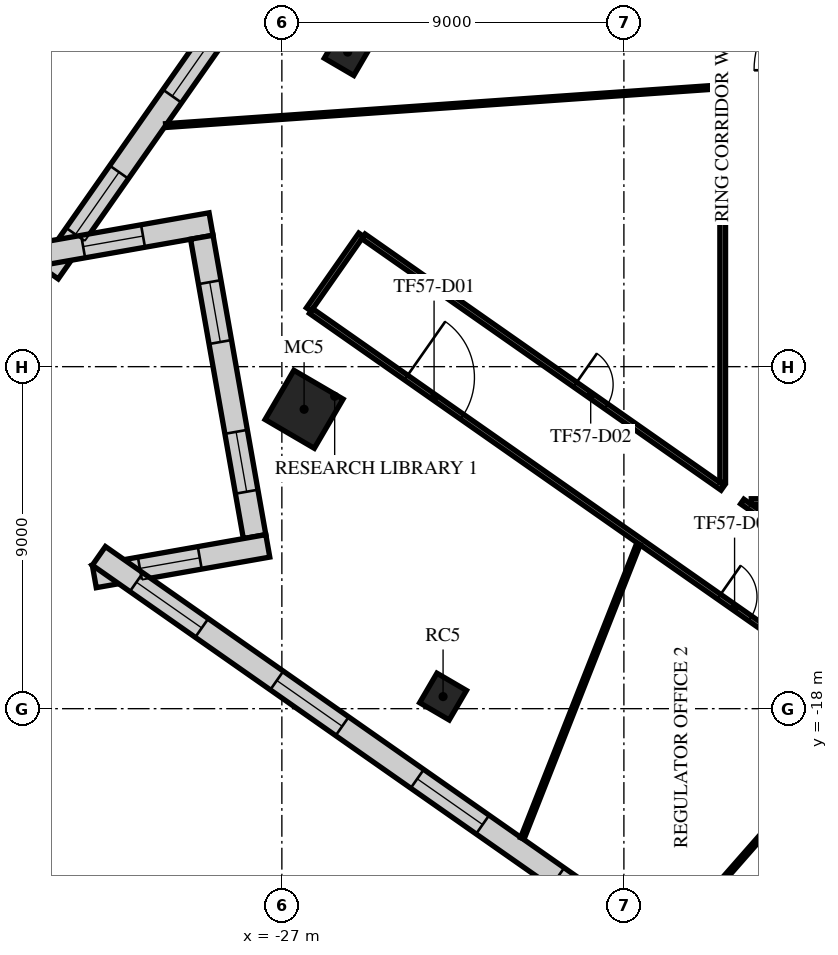
"""IFC4 building model, lengths in metres.
Left out: names, types, materials, properties, quantities, classifications, styles, units other than length and angle.
Written with IfcOpenShell. Run it as: python <this file> out.ifc"""

import sys

from ifc_helpers import new_model, si_unit, direction, frame, frame_2d, origin, origin_2d, place, context, subcontext, project, spatial, rectangle, extrude, element, fill, save


model = new_model("IFC4")
c1 = context("Model", 3, precision=1e-05, world=origin(), true_north=direction((0.0, 1.0)))
c2 = subcontext(c1, "Body", "Model", "MODEL_VIEW")
j1 = project(units=[si_unit("LENGTHUNIT", "METRE"), si_unit("PLANEANGLEUNIT", "RADIAN")], contexts=[c1])
p1 = place(None, origin())
s1 = spatial("IfcSite", under=j1, at=p1, CompositionType="ELEMENT")
p2 = place(p1, origin())
s2 = spatial("IfcBuilding", under=s1, at=p2, CompositionType="ELEMENT")
p3 = place(p2, frame((0.0, 0.0, 246.9)))
s3 = spatial("IfcBuildingStorey", under=s2, at=p3, CompositionType="ELEMENT", Elevation=246.9)
p4 = place(p3, frame((-25.268, -0.722, 0.0), z_axis=(0.0, 0.0, 1.0), x_axis=(0.504643651291, 0.863327739165, 0.0)))
e1 = element("IfcColumn", 1, at=p4, inside=s3, PredefinedType="COLUMN", context=c2, shape_type="SweptSolid", body=[
    extrude(rectangle(XDim=0.9, YDim=0.9, at=origin_2d()), origin(), (0.0, 0.0, 1.0), 4.0),
])
p5 = place(p3, frame((-26.415, -10.122, 0.0), z_axis=(0.0, 0.0, 1.0), x_axis=(0.504643651291, 0.863327739165, 0.0)))
e2 = element("IfcColumn", 2, at=p5, inside=s3, PredefinedType="COLUMN", context=c2, shape_type="SweptSolid", body=[
    extrude(rectangle(XDim=1.5, YDim=1.5, at=origin_2d()), origin(), (0.0, 0.0, 1.0), 4.0),
])
p6 = place(p3, frame((-22.758, -17.682, 0.0), z_axis=(0.0, 0.0, 1.0), x_axis=(0.504643651291, 0.863327739165, 0.0)))
e3 = element("IfcColumn", 3, at=p6, inside=s3, PredefinedType="COLUMN", context=c2, shape_type="SweptSolid", body=[
    extrude(rectangle(XDim=0.9, YDim=0.9, at=origin_2d()), origin(), (0.0, 0.0, 1.0), 4.0),
])
p7 = place(p3, frame((-5.115, 33.491, 0.0), z_axis=(0.0, 0.0, 1.0), x_axis=(-0.57357740375, -0.819151366908, 0.0)))
e4 = element("IfcWall", 4, at=p7, inside=s3, PredefinedType="STANDARD", context=c2, shape_type="SweptSolid", body=[
    extrude(rectangle(XDim=48.843, YDim=0.6, at=frame_2d((24.422, 0.0))), origin(), (0.0, 0.0, 1.0), 3.64),
])
p8 = place(p7, frame((1.22, 0.0, 0.9)))
e5 = element("IfcOpeningElement", 5, at=p8, cuts=e4, PredefinedType="OPENING", context=c2, shape_type="SweptSolid", body=[
    extrude(rectangle(XDim=2.0, YDim=2.1, at=frame_2d((1.0, 1.05))), frame((0.0, 0.31, 0.0), z_axis=(0.0, -1.0, 0.0), x_axis=(1.0, 0.0, 0.0)), (0.0, 0.0, 1.0), 0.62),
])
p9 = place(p7, frame((5.66, 0.0, 0.9)))
e6 = element("IfcOpeningElement", 6, at=p9, cuts=e4, PredefinedType="OPENING", context=c2, shape_type="SweptSolid", body=[
    extrude(rectangle(XDim=2.0, YDim=2.1, at=frame_2d((1.0, 1.05))), frame((0.0, 0.31, 0.0), z_axis=(0.0, -1.0, 0.0), x_axis=(1.0, 0.0, 0.0)), (0.0, 0.0, 1.0), 0.62),
])
p10 = place(p7, frame((10.101, 0.0, 0.9)))
e7 = element("IfcOpeningElement", 7, at=p10, cuts=e4, PredefinedType="OPENING", context=c2, shape_type="SweptSolid", body=[
    extrude(rectangle(XDim=2.0, YDim=2.1, at=frame_2d((1.0, 1.05))), frame((0.0, 0.31, 0.0), z_axis=(0.0, -1.0, 0.0), x_axis=(1.0, 0.0, 0.0)), (0.0, 0.0, 1.0), 0.62),
])
p11 = place(p7, frame((14.541, 0.0, 0.9)))
e8 = element("IfcOpeningElement", 8, at=p11, cuts=e4, PredefinedType="OPENING", context=c2, shape_type="SweptSolid", body=[
    extrude(rectangle(XDim=2.0, YDim=2.1, at=frame_2d((1.0, 1.05))), frame((0.0, 0.31, 0.0), z_axis=(0.0, -1.0, 0.0), x_axis=(1.0, 0.0, 0.0)), (0.0, 0.0, 1.0), 0.62),
])
p12 = place(p7, frame((18.981, 0.0, 0.9)))
e9 = element("IfcOpeningElement", 9, at=p12, cuts=e4, PredefinedType="OPENING", context=c2, shape_type="SweptSolid", body=[
    extrude(rectangle(XDim=2.0, YDim=2.1, at=frame_2d((1.0, 1.05))), frame((0.0, 0.31, 0.0), z_axis=(0.0, -1.0, 0.0), x_axis=(1.0, 0.0, 0.0)), (0.0, 0.0, 1.0), 0.62),
])
p13 = place(p7, frame((23.422, 0.0, 0.9)))
e10 = element("IfcOpeningElement", 10, at=p13, cuts=e4, PredefinedType="OPENING", context=c2, shape_type="SweptSolid", body=[
    extrude(rectangle(XDim=2.0, YDim=2.1, at=frame_2d((1.0, 1.05))), frame((0.0, 0.31, 0.0), z_axis=(0.0, -1.0, 0.0), x_axis=(1.0, 0.0, 0.0)), (0.0, 0.0, 1.0), 0.62),
])
p14 = place(p7, frame((27.862, 0.0, 0.9)))
e11 = element("IfcOpeningElement", 11, at=p14, cuts=e4, PredefinedType="OPENING", context=c2, shape_type="SweptSolid", body=[
    extrude(rectangle(XDim=2.0, YDim=2.1, at=frame_2d((1.0, 1.05))), frame((0.0, 0.31, 0.0), z_axis=(0.0, -1.0, 0.0), x_axis=(1.0, 0.0, 0.0)), (0.0, 0.0, 1.0), 0.62),
])
p15 = place(p7, frame((32.302, 0.0, 0.9)))
e12 = element("IfcOpeningElement", 12, at=p15, cuts=e4, PredefinedType="OPENING", context=c2, shape_type="SweptSolid", body=[
    extrude(rectangle(XDim=2.0, YDim=2.1, at=frame_2d((1.0, 1.05))), frame((0.0, 0.31, 0.0), z_axis=(0.0, -1.0, 0.0), x_axis=(1.0, 0.0, 0.0)), (0.0, 0.0, 1.0), 0.62),
])
p16 = place(p7, frame((36.742, 0.0, 0.9)))
e13 = element("IfcOpeningElement", 13, at=p16, cuts=e4, PredefinedType="OPENING", context=c2, shape_type="SweptSolid", body=[
    extrude(rectangle(XDim=2.0, YDim=2.1, at=frame_2d((1.0, 1.05))), frame((0.0, 0.31, 0.0), z_axis=(0.0, -1.0, 0.0), x_axis=(1.0, 0.0, 0.0)), (0.0, 0.0, 1.0), 0.62),
])
p17 = place(p7, frame((41.183, 0.0, 0.9)))
e14 = element("IfcOpeningElement", 14, at=p17, cuts=e4, PredefinedType="OPENING", context=c2, shape_type="SweptSolid", body=[
    extrude(rectangle(XDim=2.0, YDim=2.1, at=frame_2d((1.0, 1.05))), frame((0.0, 0.31, 0.0), z_axis=(0.0, -1.0, 0.0), x_axis=(1.0, 0.0, 0.0)), (0.0, 0.0, 1.0), 0.62),
])
p18 = place(p7, frame((45.623, 0.0, 0.9)))
e15 = element("IfcOpeningElement", 15, at=p18, cuts=e4, PredefinedType="OPENING", context=c2, shape_type="SweptSolid", body=[
    extrude(rectangle(XDim=2.0, YDim=2.1, at=frame_2d((1.0, 1.05))), frame((0.0, 0.31, 0.0), z_axis=(0.0, -1.0, 0.0), x_axis=(1.0, 0.0, 0.0)), (0.0, 0.0, 1.0), 0.62),
])
p19 = place(p3, frame((-33.429, -6.052, 0.0), z_axis=(0.0, 0.0, 1.0), x_axis=(0.984808997794, 0.173641118013, 0.0)))
e16 = element("IfcWall", 16, at=p19, inside=s3, PredefinedType="STANDARD", context=c2, shape_type="SweptSolid", body=[
    extrude(rectangle(XDim=4.635, YDim=0.6, at=frame_2d((2.318, 0.0))), origin(), (0.0, 0.0, 1.0), 3.64),
])
p20 = place(p19, frame((1.218, 0.0, 0.9)))
e17 = element("IfcOpeningElement", 17, at=p20, cuts=e16, PredefinedType="OPENING", context=c2, shape_type="SweptSolid", body=[
    extrude(rectangle(XDim=1.6, YDim=2.1, at=frame_2d((0.8, 1.05))), frame((0.0, 0.31, 0.0), z_axis=(0.0, -1.0, 0.0), x_axis=(1.0, 0.0, 0.0)), (0.0, 0.0, 1.0), 0.62),
])
p21 = place(p3, frame((-29.107, -5.594, 0.0), z_axis=(0.0, 0.0, 1.0), x_axis=(0.173640837858, -0.98480904719, 0.0)))
e18 = element("IfcWall", 18, at=p21, inside=s3, PredefinedType="STANDARD", context=c2, shape_type="SweptSolid", body=[
    extrude(rectangle(XDim=8.0, YDim=0.6, at=frame_2d((4.0, 0.0))), origin(), (0.0, 0.0, 1.0), 3.64),
])
p22 = place(p21, frame((1.2, 0.0, 0.9)))
e19 = element("IfcOpeningElement", 19, at=p22, cuts=e18, PredefinedType="OPENING", context=c2, shape_type="SweptSolid", body=[
    extrude(rectangle(XDim=1.6, YDim=2.1, at=frame_2d((0.8, 1.05))), frame((0.0, 0.31, 0.0), z_axis=(0.0, -1.0, 0.0), x_axis=(1.0, 0.0, 0.0)), (0.0, 0.0, 1.0), 0.62),
])
p23 = place(p21, frame((5.2, 0.0, 0.9)))
e20 = element("IfcOpeningElement", 20, at=p23, cuts=e18, PredefinedType="OPENING", context=c2, shape_type="SweptSolid", body=[
    extrude(rectangle(XDim=1.6, YDim=2.1, at=frame_2d((0.8, 1.05))), frame((0.0, 0.31, 0.0), z_axis=(0.0, -1.0, 0.0), x_axis=(1.0, 0.0, 0.0)), (0.0, 0.0, 1.0), 0.62),
])
p24 = place(p3, frame((-27.37, -13.716, 0.0), z_axis=(0.0, 0.0, 1.0), x_axis=(-0.984799990421, -0.173692195754, 0.0)))
e21 = element("IfcWall", 21, at=p24, inside=s3, PredefinedType="STANDARD", context=c2, shape_type="SweptSolid", body=[
    extrude(rectangle(XDim=4.636, YDim=0.6, at=frame_2d((2.318, 0.0))), origin(), (0.0, 0.0, 1.0), 3.64),
])
p25 = place(p24, frame((1.818, 0.0, 0.9)))
e22 = element("IfcOpeningElement", 22, at=p25, cuts=e21, PredefinedType="OPENING", context=c2, shape_type="SweptSolid", body=[
    extrude(rectangle(XDim=1.6, YDim=2.1, at=frame_2d((0.8, 1.05))), frame((0.0, 0.31, 0.0), z_axis=(0.0, -1.0, 0.0), x_axis=(1.0, 0.0, 0.0)), (0.0, 0.0, 1.0), 0.62),
])
p26 = place(p3, frame((-31.815, -13.98, 0.0), z_axis=(0.0, 0.0, 1.0), x_axis=(0.819151180661, -0.573577669737, 0.0)))
e23 = element("IfcWall", 23, at=p26, inside=s3, PredefinedType="STANDARD", context=c2, shape_type="SweptSolid", body=[
    extrude(rectangle(XDim=36.086, YDim=0.6, at=frame_2d((18.043, 0.0))), origin(), (0.0, 0.0, 1.0), 3.64),
])
p27 = place(p26, frame((1.205, 0.0, 0.9)))
e24 = element("IfcOpeningElement", 24, at=p27, cuts=e23, PredefinedType="OPENING", context=c2, shape_type="SweptSolid", body=[
    extrude(rectangle(XDim=2.1, YDim=2.1, at=frame_2d((1.05, 1.05))), frame((0.0, 0.31, 0.0), z_axis=(0.0, -1.0, 0.0), x_axis=(1.0, 0.0, 0.0)), (0.0, 0.0, 1.0), 0.62),
])
p28 = place(p26, frame((5.716, 0.0, 0.9)))
e25 = element("IfcOpeningElement", 25, at=p28, cuts=e23, PredefinedType="OPENING", context=c2, shape_type="SweptSolid", body=[
    extrude(rectangle(XDim=2.1, YDim=2.1, at=frame_2d((1.05, 1.05))), frame((0.0, 0.31, 0.0), z_axis=(0.0, -1.0, 0.0), x_axis=(1.0, 0.0, 0.0)), (0.0, 0.0, 1.0), 0.62),
])
p29 = place(p26, frame((10.227, 0.0, 0.9)))
e26 = element("IfcOpeningElement", 26, at=p29, cuts=e23, PredefinedType="OPENING", context=c2, shape_type="SweptSolid", body=[
    extrude(rectangle(XDim=2.1, YDim=2.1, at=frame_2d((1.05, 1.05))), frame((0.0, 0.31, 0.0), z_axis=(0.0, -1.0, 0.0), x_axis=(1.0, 0.0, 0.0)), (0.0, 0.0, 1.0), 0.62),
])
p30 = place(p26, frame((14.738, 0.0, 0.9)))
e27 = element("IfcOpeningElement", 27, at=p30, cuts=e23, PredefinedType="OPENING", context=c2, shape_type="SweptSolid", body=[
    extrude(rectangle(XDim=2.1, YDim=2.1, at=frame_2d((1.05, 1.05))), frame((0.0, 0.31, 0.0), z_axis=(0.0, -1.0, 0.0), x_axis=(1.0, 0.0, 0.0)), (0.0, 0.0, 1.0), 0.62),
])
p31 = place(p26, frame((19.249, 0.0, 0.9)))
e28 = element("IfcOpeningElement", 28, at=p31, cuts=e23, PredefinedType="OPENING", context=c2, shape_type="SweptSolid", body=[
    extrude(rectangle(XDim=2.1, YDim=2.1, at=frame_2d((1.05, 1.05))), frame((0.0, 0.31, 0.0), z_axis=(0.0, -1.0, 0.0), x_axis=(1.0, 0.0, 0.0)), (0.0, 0.0, 1.0), 0.62),
])
p32 = place(p26, frame((23.759, 0.0, 0.9)))
e29 = element("IfcOpeningElement", 29, at=p32, cuts=e23, PredefinedType="OPENING", context=c2, shape_type="SweptSolid", body=[
    extrude(rectangle(XDim=2.1, YDim=2.1, at=frame_2d((1.05, 1.05))), frame((0.0, 0.31, 0.0), z_axis=(0.0, -1.0, 0.0), x_axis=(1.0, 0.0, 0.0)), (0.0, 0.0, 1.0), 0.62),
])
p33 = place(p26, frame((28.27, 0.0, 0.9)))
e30 = element("IfcOpeningElement", 30, at=p33, cuts=e23, PredefinedType="OPENING", context=c2, shape_type="SweptSolid", body=[
    extrude(rectangle(XDim=2.1, YDim=2.1, at=frame_2d((1.05, 1.05))), frame((0.0, 0.31, 0.0), z_axis=(0.0, -1.0, 0.0), x_axis=(1.0, 0.0, 0.0)), (0.0, 0.0, 1.0), 0.62),
])
p34 = place(p26, frame((32.781, 0.0, 0.9)))
e31 = element("IfcOpeningElement", 31, at=p34, cuts=e23, PredefinedType="OPENING", context=c2, shape_type="SweptSolid", body=[
    extrude(rectangle(XDim=2.1, YDim=2.1, at=frame_2d((1.05, 1.05))), frame((0.0, 0.31, 0.0), z_axis=(0.0, -1.0, 0.0), x_axis=(1.0, 0.0, 0.0)), (0.0, 0.0, 1.0), 0.62),
])
p35 = place(p3, frame((-26.292, -7.494, 0.0), z_axis=(0.0, 0.0, 1.0), x_axis=(0.573708088123, 0.819059844958, 0.0)))
e32 = element("IfcWall", 32, at=p35, inside=s3, PredefinedType="PARTITIONING", context=c2, shape_type="SweptSolid", body=[
    extrude(rectangle(XDim=2.4, YDim=0.15, at=frame_2d((1.2, 0.0))), origin(), (0.0, 0.0, 1.0), 3.24),
])
p36 = place(p3, frame((-26.231, -7.537, 0.0), z_axis=(0.0, 0.0, 1.0), x_axis=(0.819166569978, -0.573555690959, 0.0)))
e33 = element("IfcWall", 33, at=p36, inside=s3, PredefinedType="PARTITIONING", context=c2, shape_type="SweptSolid", body=[
    extrude(rectangle(XDim=34.403, YDim=0.15, at=frame_2d((17.201, 0.0))), origin(), (0.0, 0.0, 1.0), 3.24),
])
p37 = place(p36, frame((3.05, 0.0, 0.0)))
e34 = element("IfcOpeningElement", 34, at=p37, cuts=e33, PredefinedType="OPENING", context=c2, shape_type="SweptSolid", body=[
    extrude(rectangle(XDim=1.8, YDim=2.1, at=frame_2d((0.9, 1.05))), frame((0.0, 0.085, 0.0), z_axis=(0.0, -1.0, 0.0), x_axis=(1.0, 0.0, 0.0)), (0.0, 0.0, 1.0), 0.17),
])
p38 = place(p36, frame((13.103, 0.0, 0.0)))
e35 = element("IfcOpeningElement", 35, at=p38, cuts=e33, PredefinedType="OPENING", context=c2, shape_type="SweptSolid", body=[
    extrude(rectangle(XDim=1.0, YDim=2.1, at=frame_2d((0.5, 1.05))), frame((0.0, 0.085, 0.0), z_axis=(0.0, -1.0, 0.0), x_axis=(1.0, 0.0, 0.0)), (0.0, 0.0, 1.0), 0.17),
])
p39 = place(p36, frame((19.173, 0.0, 0.0)))
e36 = element("IfcOpeningElement", 36, at=p39, cuts=e33, PredefinedType="OPENING", context=c2, shape_type="SweptSolid", body=[
    extrude(rectangle(XDim=1.0, YDim=2.1, at=frame_2d((0.5, 1.05))), frame((0.0, 0.085, 0.0), z_axis=(0.0, -1.0, 0.0), x_axis=(1.0, 0.0, 0.0)), (0.0, 0.0, 1.0), 0.17),
])
p40 = place(p3, frame((-24.854, -5.571, 0.0), z_axis=(0.0, 0.0, 1.0), x_axis=(0.819176259714, -0.573541851586, 0.0)))
e37 = element("IfcWall", 37, at=p40, inside=s3, PredefinedType="PARTITIONING", context=c2, shape_type="SweptSolid", body=[
    extrude(rectangle(XDim=11.54, YDim=0.15, at=frame_2d((5.77, 0.0))), origin(), (0.0, 0.0, 1.0), 3.24),
])
p41 = place(p40, frame((6.8, 0.0, 0.0)))
e38 = element("IfcOpeningElement", 38, at=p41, cuts=e37, PredefinedType="OPENING", context=c2, shape_type="SweptSolid", body=[
    extrude(rectangle(XDim=1.0, YDim=2.1, at=frame_2d((0.5, 1.05))), frame((0.0, 0.085, 0.0), z_axis=(0.0, -1.0, 0.0), x_axis=(1.0, 0.0, 0.0)), (0.0, 0.0, 1.0), 0.17),
])
p42 = place(p3, frame((-15.4, -12.046, 0.0), z_axis=(0.0, 0.0, 1.0), x_axis=(0.0, 1.0, 0.0)))
e39 = element("IfcWall", 39, at=p42, inside=s3, PredefinedType="PARTITIONING", context=c2, shape_type="SweptSolid", body=[
    extrude(rectangle(XDim=27.446, YDim=0.15, at=frame_2d((13.723, 0.0))), origin(), (0.0, 0.0, 1.0), 3.24),
])
p43 = place(p42, frame((12.961, 0.0, 0.0)))
e40 = element("IfcOpeningElement", 40, at=p43, cuts=e39, PredefinedType="OPENING", context=c2, shape_type="SweptSolid", body=[
    extrude(rectangle(XDim=1.0, YDim=2.1, at=frame_2d((0.5, 1.05))), frame((0.0, 0.085, 0.0), z_axis=(0.0, -1.0, 0.0), x_axis=(1.0, 0.0, 0.0)), (0.0, 0.0, 1.0), 0.17),
])
p44 = place(p3, frame((-14.886, -12.55, 0.0), z_axis=(0.0, 0.0, 1.0), x_axis=(0.819131763787, -0.57360539882, 0.0)))
e41 = element("IfcWall", 41, at=p44, inside=s3, PredefinedType="PARTITIONING", context=c2, shape_type="SweptSolid", body=[
    extrude(rectangle(XDim=7.559, YDim=0.15, at=frame_2d((3.78, 0.0))), origin(), (0.0, 0.0, 1.0), 3.24),
])
p45 = place(p44, frame((4.3, 0.0, 0.0)))
e42 = element("IfcOpeningElement", 42, at=p45, cuts=e41, PredefinedType="OPENING", context=c2, shape_type="SweptSolid", body=[
    extrude(rectangle(XDim=1.0, YDim=2.1, at=frame_2d((0.5, 1.05))), frame((0.0, 0.085, 0.0), z_axis=(0.0, -1.0, 0.0), x_axis=(1.0, 0.0, 0.0)), (0.0, 0.0, 1.0), 0.17),
])
p46 = place(p3, frame((-14.648, -12.55, 0.0), z_axis=(0.0, 0.0, 1.0), x_axis=(1.0, 0.0, 0.0)))
e43 = element("IfcWall", 43, at=p46, inside=s3, PredefinedType="PARTITIONING", context=c2, shape_type="SweptSolid", body=[
    extrude(rectangle(XDim=2.098, YDim=0.15, at=frame_2d((1.049, 0.0))), origin(), (0.0, 0.0, 1.0), 3.24),
])
p47 = place(p3, frame((-30.057, -2.656, 0.0), z_axis=(0.0, 0.0, 1.0), x_axis=(0.99756824466, 0.069696465096, 0.0)))
e44 = element("IfcWall", 44, at=p47, inside=s3, PredefinedType="PARTITIONING", context=c2, shape_type="SweptSolid", body=[
    extrude(rectangle(XDim=14.614, YDim=0.1, at=frame_2d((7.307, 0.0))), origin(), (0.0, 0.0, 1.0), 3.64),
])
p48 = place(p3, frame((-20.673, -21.413, 0.0), z_axis=(0.0, 0.0, 1.0), x_axis=(0.367046287702, 0.930202678283, 0.0)))
e45 = element("IfcWall", 45, at=p48, inside=s3, PredefinedType="PARTITIONING", context=c2, shape_type="SweptSolid", body=[
    extrude(rectangle(XDim=8.321, YDim=0.1, at=frame_2d((4.161, 0.0))), origin(), (0.0, 0.0, 1.0), 3.24),
])
p49 = place(p3, frame((-16.809, -24.119, 0.0), z_axis=(0.0, 0.0, 1.0), x_axis=(0.659598527061, 0.75161810988, 0.0)))
e46 = element("IfcWall", 46, at=p49, inside=s3, PredefinedType="PARTITIONING", context=c2, shape_type="SweptSolid", body=[
    extrude(rectangle(XDim=8.148, YDim=0.1, at=frame_2d((4.074, 0.0))), origin(), (0.0, 0.0, 1.0), 3.24),
])
p50 = place(p17, origin())
e47 = element("IfcWindow", 47, at=p50, inside=s3, PartitioningType="SINGLE_PANEL", PredefinedType="WINDOW", context=c2, shape_type="SweptSolid", body=[
    extrude(rectangle(XDim=2.0, YDim=2.1, at=frame_2d((1.0, 1.05))), frame((0.0, 0.03, 0.0), z_axis=(0.0, -1.0, 0.0), x_axis=(1.0, 0.0, 0.0)), (0.0, 0.0, 1.0), 0.06),
])
fill(e14, e47)
p51 = place(p18, origin())
e48 = element("IfcWindow", 48, at=p51, inside=s3, PartitioningType="SINGLE_PANEL", PredefinedType="WINDOW", context=c2, shape_type="SweptSolid", body=[
    extrude(rectangle(XDim=2.0, YDim=2.1, at=frame_2d((1.0, 1.05))), frame((0.0, 0.03, 0.0), z_axis=(0.0, -1.0, 0.0), x_axis=(1.0, 0.0, 0.0)), (0.0, 0.0, 1.0), 0.06),
])
fill(e15, e48)
p52 = place(p20, origin())
e49 = element("IfcWindow", 49, at=p52, inside=s3, PartitioningType="SINGLE_PANEL", PredefinedType="WINDOW", context=c2, shape_type="SweptSolid", body=[
    extrude(rectangle(XDim=1.6, YDim=2.1, at=frame_2d((0.8, 1.05))), frame((0.0, 0.03, 0.0), z_axis=(0.0, -1.0, 0.0), x_axis=(1.0, 0.0, 0.0)), (0.0, 0.0, 1.0), 0.06),
])
fill(e17, e49)
p53 = place(p22, origin())
e50 = element("IfcWindow", 50, at=p53, inside=s3, PartitioningType="SINGLE_PANEL", PredefinedType="WINDOW", context=c2, shape_type="SweptSolid", body=[
    extrude(rectangle(XDim=1.6, YDim=2.1, at=frame_2d((0.8, 1.05))), frame((0.0, 0.03, 0.0), z_axis=(0.0, -1.0, 0.0), x_axis=(1.0, 0.0, 0.0)), (0.0, 0.0, 1.0), 0.06),
])
fill(e19, e50)
p54 = place(p23, origin())
e51 = element("IfcWindow", 51, at=p54, inside=s3, PartitioningType="SINGLE_PANEL", PredefinedType="WINDOW", context=c2, shape_type="SweptSolid", body=[
    extrude(rectangle(XDim=1.6, YDim=2.1, at=frame_2d((0.8, 1.05))), frame((0.0, 0.03, 0.0), z_axis=(0.0, -1.0, 0.0), x_axis=(1.0, 0.0, 0.0)), (0.0, 0.0, 1.0), 0.06),
])
fill(e20, e51)
p55 = place(p25, origin())
e52 = element("IfcWindow", 52, at=p55, inside=s3, PartitioningType="SINGLE_PANEL", PredefinedType="WINDOW", context=c2, shape_type="SweptSolid", body=[
    extrude(rectangle(XDim=1.6, YDim=2.1, at=frame_2d((0.8, 1.05))), frame((0.0, 0.03, 0.0), z_axis=(0.0, -1.0, 0.0), x_axis=(1.0, 0.0, 0.0)), (0.0, 0.0, 1.0), 0.06),
])
fill(e22, e52)
p56 = place(p27, origin())
e53 = element("IfcWindow", 53, at=p56, inside=s3, PartitioningType="SINGLE_PANEL", PredefinedType="WINDOW", context=c2, shape_type="SweptSolid", body=[
    extrude(rectangle(XDim=2.1, YDim=2.1, at=frame_2d((1.05, 1.05))), frame((0.0, 0.03, 0.0), z_axis=(0.0, -1.0, 0.0), x_axis=(1.0, 0.0, 0.0)), (0.0, 0.0, 1.0), 0.06),
])
fill(e24, e53)
p57 = place(p28, origin())
e54 = element("IfcWindow", 54, at=p57, inside=s3, PartitioningType="SINGLE_PANEL", PredefinedType="WINDOW", context=c2, shape_type="SweptSolid", body=[
    extrude(rectangle(XDim=2.1, YDim=2.1, at=frame_2d((1.05, 1.05))), frame((0.0, 0.03, 0.0), z_axis=(0.0, -1.0, 0.0), x_axis=(1.0, 0.0, 0.0)), (0.0, 0.0, 1.0), 0.06),
])
fill(e25, e54)
p58 = place(p29, origin())
e55 = element("IfcWindow", 55, at=p58, inside=s3, PartitioningType="SINGLE_PANEL", PredefinedType="WINDOW", context=c2, shape_type="SweptSolid", body=[
    extrude(rectangle(XDim=2.1, YDim=2.1, at=frame_2d((1.05, 1.05))), frame((0.0, 0.03, 0.0), z_axis=(0.0, -1.0, 0.0), x_axis=(1.0, 0.0, 0.0)), (0.0, 0.0, 1.0), 0.06),
])
fill(e26, e55)
p59 = place(p37, frame((1.8, 0.0, 0.0), z_axis=(0.0, 0.0, 1.0), x_axis=(-1.0, 0.0, 0.0)))
e56 = element("IfcDoor", 56, at=p59, inside=s3, OperationType="DOUBLE_DOOR_SINGLE_SWING", PredefinedType="DOOR", context=c2, shape_type="SweptSolid", body=[
    extrude(rectangle(XDim=1.8, YDim=2.1, at=frame_2d((0.9, 1.05))), frame((0.0, 0.025, 0.0), z_axis=(0.0, -1.0, 0.0), x_axis=(1.0, 0.0, 0.0)), (0.0, 0.0, 1.0), 0.05),
])
fill(e34, e56)
p60 = place(p41, origin())
e57 = element("IfcDoor", 57, at=p60, inside=s3, OperationType="SINGLE_SWING_RIGHT", PredefinedType="DOOR", context=c2, shape_type="SweptSolid", body=[
    extrude(rectangle(XDim=1.0, YDim=2.1, at=frame_2d((0.5, 1.05))), frame((0.0, 0.025, 0.0), z_axis=(0.0, -1.0, 0.0), x_axis=(1.0, 0.0, 0.0)), (0.0, 0.0, 1.0), 0.05),
])
fill(e38, e57)
p61 = place(p38, frame((1.0, 0.0, 0.0), z_axis=(0.0, 0.0, 1.0), x_axis=(-1.0, 0.0, 0.0)))
e58 = element("IfcDoor", 58, at=p61, inside=s3, OperationType="SINGLE_SWING_LEFT", PredefinedType="DOOR", context=c2, shape_type="SweptSolid", body=[
    extrude(rectangle(XDim=1.0, YDim=2.1, at=frame_2d((0.5, 1.05))), frame((0.0, 0.025, 0.0), z_axis=(0.0, -1.0, 0.0), x_axis=(1.0, 0.0, 0.0)), (0.0, 0.0, 1.0), 0.05),
])
fill(e35, e58)
save(model, sys.argv[1])
